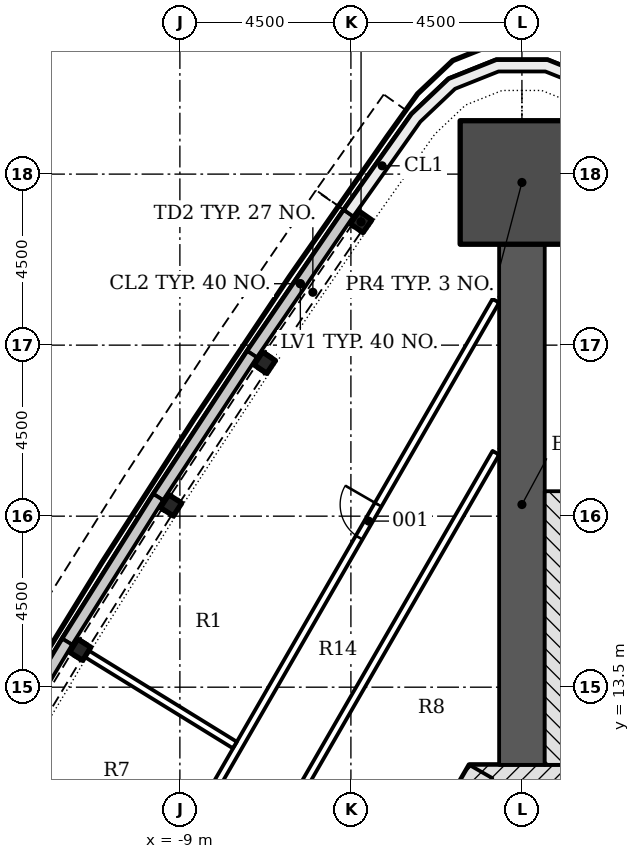
"""IFC4 building model, lengths in metres.
Left out: names, types, materials, properties, quantities, classifications, styles, units other than length and angle.
Written with IfcOpenShell. Run it as: python <this file> out.ifc"""

import sys

from ifc_helpers import new_model, si_unit, direction, frame, frame_2d, origin, origin_2d, place, context, subcontext, project, spatial, polyline, rectangle, i_section, outline, extrude, element, fill, save


model = new_model("IFC4")
c1 = context("Model", 3, precision=1e-05, world=origin(), true_north=direction((0.0, 1.0)))
c2 = subcontext(c1, "Body", "Model", "MODEL_VIEW")
j1 = project(units=[si_unit("LENGTHUNIT", "METRE"), si_unit("PLANEANGLEUNIT", "RADIAN")], contexts=[c1])
p1 = place(None, origin())
s1 = spatial("IfcSite", under=j1, at=p1, CompositionType="ELEMENT")
p2 = place(p1, origin())
s2 = spatial("IfcBuilding", under=s1, at=p2, CompositionType="ELEMENT")
p3 = place(p2, frame((0.0, 0.0, 52.8)))
s3 = spatial("IfcBuildingStorey", under=s2, at=p3, CompositionType="ELEMENT", Elevation=52.8)
p4 = place(p3, frame((10.311, -4.703, -0.3), z_axis=(0.0, 0.0, 1.0), x_axis=(-0.500001446645, 0.866024568562, 0.0)))
e1 = element("IfcWall", 1, at=p4, inside=s3, PredefinedType="SHEAR", context=c2, shape_type="SweptSolid", body=[
    extrude(rectangle(XDim=18.458, YDim=0.7, at=frame_2d((9.229, 0.0))), origin(), (0.0, 0.0, 1.0), 5.5),
])
p5 = place(p4, frame((8.7, 0.0, 0.3)))
e2 = element("IfcOpeningElement", 2, at=p5, cuts=e1, PredefinedType="OPENING", context=c2, shape_type="SweptSolid", body=[
    extrude(rectangle(XDim=1.0, YDim=2.1, at=frame_2d((0.5, 1.05))), frame((0.0, 0.36, 0.0), z_axis=(0.0, -1.0, 0.0), x_axis=(1.0, 0.0, 0.0)), (0.0, 0.0, 1.0), 0.72),
])
p6 = place(p4, frame((4.002, 0.0, 0.3)))
e3 = element("IfcOpeningElement", 3, at=p6, cuts=e1, PredefinedType="OPENING", context=c2, shape_type="SweptSolid", body=[
    extrude(rectangle(XDim=0.9, YDim=2.1, at=frame_2d((0.45, 1.05))), frame((0.0, 0.36, 0.0), z_axis=(0.0, -1.0, 0.0), x_axis=(1.0, 0.0, 0.0)), (0.0, 0.0, 1.0), 0.72),
])
p7 = place(p4, frame((14.093, 0.0, 0.3)))
e4 = element("IfcOpeningElement", 4, at=p7, cuts=e1, PredefinedType="OPENING", context=c2, shape_type="SweptSolid", body=[
    extrude(rectangle(XDim=0.9, YDim=2.1, at=frame_2d((0.45, 1.05))), frame((0.0, 0.36, 0.0), z_axis=(0.0, -1.0, 0.0), x_axis=(1.0, 0.0, 0.0)), (0.0, 0.0, 1.0), 0.72),
])
p8 = place(p3, frame((1.386, 11.106, -0.3), z_axis=(0.0, 0.0, 1.0), x_axis=(-1.0, 0.0, 0.0)))
e5 = element("IfcWall", 5, at=p8, inside=s3, PredefinedType="SHEAR", context=c2, shape_type="SweptSolid", body=[
    extrude(rectangle(XDim=2.771, YDim=0.7, at=frame_2d((1.386, 0.0))), origin(), (0.0, 0.0, 1.0), 5.5),
])
p9 = place(p3, frame((-1.083, 11.281, -0.3), z_axis=(0.0, 0.0, 1.0), x_axis=(-0.500001446645, -0.866024568562, 0.0)))
e6 = element("IfcWall", 6, at=p9, inside=s3, PredefinedType="SHEAR", context=c2, shape_type="SweptSolid", body=[
    extrude(rectangle(XDim=18.458, YDim=0.7, at=frame_2d((9.229, 0.0))), origin(), (0.0, 0.0, 1.0), 5.5),
])
p10 = place(p9, frame((8.979, 0.0, 0.3)))
e7 = element("IfcOpeningElement", 7, at=p10, cuts=e6, PredefinedType="OPENING", context=c2, shape_type="SweptSolid", body=[
    extrude(rectangle(XDim=1.2, YDim=2.1, at=frame_2d((0.6, 1.05))), frame((0.0, 0.36, 0.0), z_axis=(0.0, -1.0, 0.0), x_axis=(1.0, 0.0, 0.0)), (0.0, 0.0, 1.0), 0.72),
])
p11 = place(p9, frame((11.029, 0.0, 0.3)))
e8 = element("IfcOpeningElement", 8, at=p11, cuts=e6, PredefinedType="OPENING", context=c2, shape_type="SweptSolid", body=[
    extrude(rectangle(XDim=1.2, YDim=2.1, at=frame_2d((0.6, 1.05))), frame((0.0, 0.36, 0.0), z_axis=(0.0, -1.0, 0.0), x_axis=(1.0, 0.0, 0.0)), (0.0, 0.0, 1.0), 0.72),
])
p12 = place(p3, frame((0.0, 11.456, -0.3), z_axis=(0.0, 0.0, 1.0), x_axis=(0.0, 1.0, 0.0)))
e9 = element("IfcWall", 9, at=p12, inside=s3, PredefinedType="SHEAR", context=c2, shape_type="SweptSolid", body=[
    extrude(rectangle(XDim=13.699, YDim=1.2, at=frame_2d((6.849, 0.0))), origin(), (0.0, 0.0, 1.0), 5.5),
])
p13 = place(p3, frame((0.0, 26.78, -0.3), z_axis=(0.0, 0.0, 1.0), x_axis=(0.0, 1.0, 0.0)))
e10 = element("IfcColumn", 10, at=p13, inside=s3, PredefinedType="COLUMN", context=c2, shape_type="SweptSolid", body=[
    extrude(rectangle(XDim=3.25, YDim=3.25, at=origin_2d()), origin(), (0.0, 0.0, 1.0), 5.5),
])
for number, where, z_axis, x_axis in (
    (11, (-4.233, 25.743, -0.3), (0.0, 0.0, 1.0), (-0.572, -0.82, 0.0)),
    (12, (-6.768, 22.038, -0.3), (0.0, 0.0, 1.0), (-0.557, -0.831, 0.0)),
    (13, (-9.231, 18.285, -0.3), (0.0, 0.0, 1.0), (-0.541, -0.841, 0.0)),
    (14, (-11.623, 14.485, -0.3), (0.0, 0.0, 1.0), (-0.525, -0.851, 0.0)),
):
    element("IfcColumn", number, at=place(p3, frame(where, z_axis=z_axis, x_axis=x_axis)), inside=s3, PredefinedType="COLUMN", context=c2, shape_type="SweptSolid", body=[
        extrude(i_section(OverallWidth=0.404, OverallDepth=0.406, WebThickness=0.027, FlangeThickness=0.044, FilletRadius=0.015, at=origin_2d()), origin(), (0.0, 0.0, 1.0), 5.5),
    ])
p14 = place(p3, origin())
e15 = element("IfcWall", 15, at=p14, inside=s3, PredefinedType="NOTDEFINED", context=c2, shape_type="SweptSolid", body=[
    extrude(outline(polyline([(-4.684, 26.058), (-7.225, 22.344), (-6.977, 22.175), (-4.436, 25.889), (-4.684, 26.058)])), origin(), (0.0, 0.0, 1.0), 1.2),
])
p15 = place(p3, origin())
e16 = element("IfcWall", 16, at=p15, inside=s3, PredefinedType="NOTDEFINED", context=c2, shape_type="SweptSolid", body=[
    extrude(outline(polyline([(-7.225, 22.344), (-9.694, 18.582), (-9.443, 18.418), (-6.974, 22.179), (-7.225, 22.344)])), origin(), (0.0, 0.0, 1.0), 1.2),
])
p16 = place(p3, origin())
e17 = element("IfcWall", 17, at=p16, inside=s3, PredefinedType="NOTDEFINED", context=c2, shape_type="SweptSolid", body=[
    extrude(outline(polyline([(-9.694, 18.582), (-12.091, 14.774), (-11.837, 14.614), (-9.44, 18.422), (-9.694, 18.582)])), origin(), (0.0, 0.0, 1.0), 1.2),
])
p17 = place(p3, origin())
e18 = element("IfcWall", 18, at=p17, inside=s3, PredefinedType="NOTDEFINED", context=c2, shape_type="SweptSolid", body=[
    extrude(outline(polyline([(-12.091, 14.774), (-14.415, 10.921), (-14.158, 10.766), (-11.834, 14.619), (-12.091, 14.774)])), origin(), (0.0, 0.0, 1.0), 1.2),
])
p18 = place(p3, origin())
e19 = element("IfcWall", 19, at=p18, inside=s3, PredefinedType="NOTDEFINED", context=c2, shape_type="SweptSolid", body=[
    extrude(outline(polyline([(4.684, 26.058), (2.901, 28.576), (1.924, 29.502), (0.673, 30.001), (-0.673, 30.001), (-1.924, 29.502), (-2.901, 28.576), (-4.684, 26.058), (-4.439, 25.885), (-2.673, 28.379), (-1.759, 29.245), (-0.615, 29.701), (0.615, 29.701), (1.759, 29.245), (2.673, 28.379), (4.439, 25.885), (4.684, 26.058)])), origin(), (0.0, 0.0, 1.0), 5.2),
])
p19 = place(p3, frame((1.093, 11.456, -0.3), z_axis=(0.0, 0.0, 1.0), x_axis=(0.0, 1.0, 0.0)))
e20 = element("IfcWall", 20, at=p19, inside=s3, PredefinedType="SHEAR", context=c2, shape_type="SweptSolid", body=[
    extrude(rectangle(XDim=7.2, YDim=0.986, at=frame_2d((3.6, 0.0))), origin(), (0.0, 0.0, 1.0), 5.5),
])
p20 = place(p3, frame((-0.687, 19.667, 0.0), z_axis=(0.0, 0.0, 1.0), x_axis=(-0.500000491645, -0.866025119933, 0.0)))
e21 = element("IfcWall", 21, at=p20, inside=s3, PredefinedType="PARTITIONING", context=c2, shape_type="SweptSolid", body=[
    extrude(rectangle(XDim=23.943, YDim=0.2, at=frame_2d((11.971, 0.0))), origin(), (0.0, 0.0, 1.0), 4.578),
])
p21 = place(p20, frame((16.287, 0.0, 0.0)))
e22 = element("IfcOpeningElement", 22, at=p21, cuts=e21, PredefinedType="OPENING", context=c2, shape_type="SweptSolid", body=[
    extrude(rectangle(XDim=1.2, YDim=2.1, at=frame_2d((0.6, 1.05))), frame((0.0, 0.11, 0.0), z_axis=(0.0, -1.0, 0.0), x_axis=(1.0, 0.0, 0.0)), (0.0, 0.0, 1.0), 0.22),
])
p22 = place(p3, frame((-16.104, -3.037, 0.0), z_axis=(0.0, 0.0, 1.0), x_axis=(0.500000029135, 0.866025386963, 0.0)))
e23 = element("IfcWall", 23, at=p22, inside=s3, PredefinedType="PARTITIONING", context=c2, shape_type="SweptSolid", body=[
    extrude(rectangle(XDim=30.835, YDim=0.2, at=frame_2d((15.417, 0.0))), origin(), (0.0, 0.0, 1.0), 4.578),
])
p23 = place(p22, frame((23.641, 0.0, 0.0)))
e24 = element("IfcOpeningElement", 24, at=p23, cuts=e23, PredefinedType="OPENING", context=c2, shape_type="SweptSolid", body=[
    extrude(rectangle(XDim=1.0, YDim=2.1, at=frame_2d((0.5, 1.05))), frame((0.0, 0.11, 0.0), z_axis=(0.0, -1.0, 0.0), x_axis=(1.0, 0.0, 0.0)), (0.0, 0.0, 1.0), 0.22),
])
p24 = place(p22, frame((14.681, 0.0, 0.0)))
e25 = element("IfcOpeningElement", 25, at=p24, cuts=e23, PredefinedType="OPENING", context=c2, shape_type="SweptSolid", body=[
    extrude(rectangle(XDim=1.0, YDim=2.1, at=frame_2d((0.5, 1.05))), frame((0.0, 0.11, 0.0), z_axis=(0.0, -1.0, 0.0), x_axis=(1.0, 0.0, 0.0)), (0.0, 0.0, 1.0), 0.22),
])
p25 = place(p22, frame((10.698, 0.0, 0.0)))
e26 = element("IfcOpeningElement", 26, at=p25, cuts=e23, PredefinedType="OPENING", context=c2, shape_type="SweptSolid", body=[
    extrude(rectangle(XDim=1.0, YDim=2.1, at=frame_2d((0.5, 1.05))), frame((0.0, 0.11, 0.0), z_axis=(0.0, -1.0, 0.0), x_axis=(1.0, 0.0, 0.0)), (0.0, 0.0, 1.0), 0.22),
])
p26 = place(p22, frame((6.51, 0.0, 0.0)))
e27 = element("IfcOpeningElement", 27, at=p26, cuts=e23, PredefinedType="OPENING", context=c2, shape_type="SweptSolid", body=[
    extrude(rectangle(XDim=1.0, YDim=2.1, at=frame_2d((0.5, 1.05))), frame((0.0, 0.11, 0.0), z_axis=(0.0, -1.0, 0.0), x_axis=(1.0, 0.0, 0.0)), (0.0, 0.0, 1.0), 0.22),
])
p27 = place(p22, frame((1.885, 0.0, 0.0)))
e28 = element("IfcOpeningElement", 28, at=p27, cuts=e23, PredefinedType="OPENING", context=c2, shape_type="SweptSolid", body=[
    extrude(rectangle(XDim=1.0, YDim=2.1, at=frame_2d((0.5, 1.05))), frame((0.0, 0.11, 0.0), z_axis=(0.0, -1.0, 0.0), x_axis=(1.0, 0.0, 0.0)), (0.0, 0.0, 1.0), 0.22),
])
p28 = place(p3, frame((-11.495, 14.407, 0.0), z_axis=(0.0, 0.0, 1.0), x_axis=(0.85135577801, -0.524588733437, 0.0)))
e29 = element("IfcWall", 29, at=p28, inside=s3, PredefinedType="PARTITIONING", context=c2, shape_type="SweptSolid", body=[
    extrude(rectangle(XDim=4.629, YDim=0.2, at=frame_2d((2.315, 0.0))), origin(), (0.0, 0.0, 1.0), 4.578),
])
p29 = place(p23, origin())
e30 = element("IfcDoor", 30, at=p29, inside=s3, OperationType="SINGLE_SWING_RIGHT", PredefinedType="DOOR", context=c2, shape_type="SweptSolid", body=[
    extrude(rectangle(XDim=1.0, YDim=2.1, at=frame_2d((0.5, 1.05))), frame((0.0, 0.025, 0.0), z_axis=(0.0, -1.0, 0.0), x_axis=(1.0, 0.0, 0.0)), (0.0, 0.0, 1.0), 0.05),
])
fill(e24, e30)
save(model, sys.argv[1])
